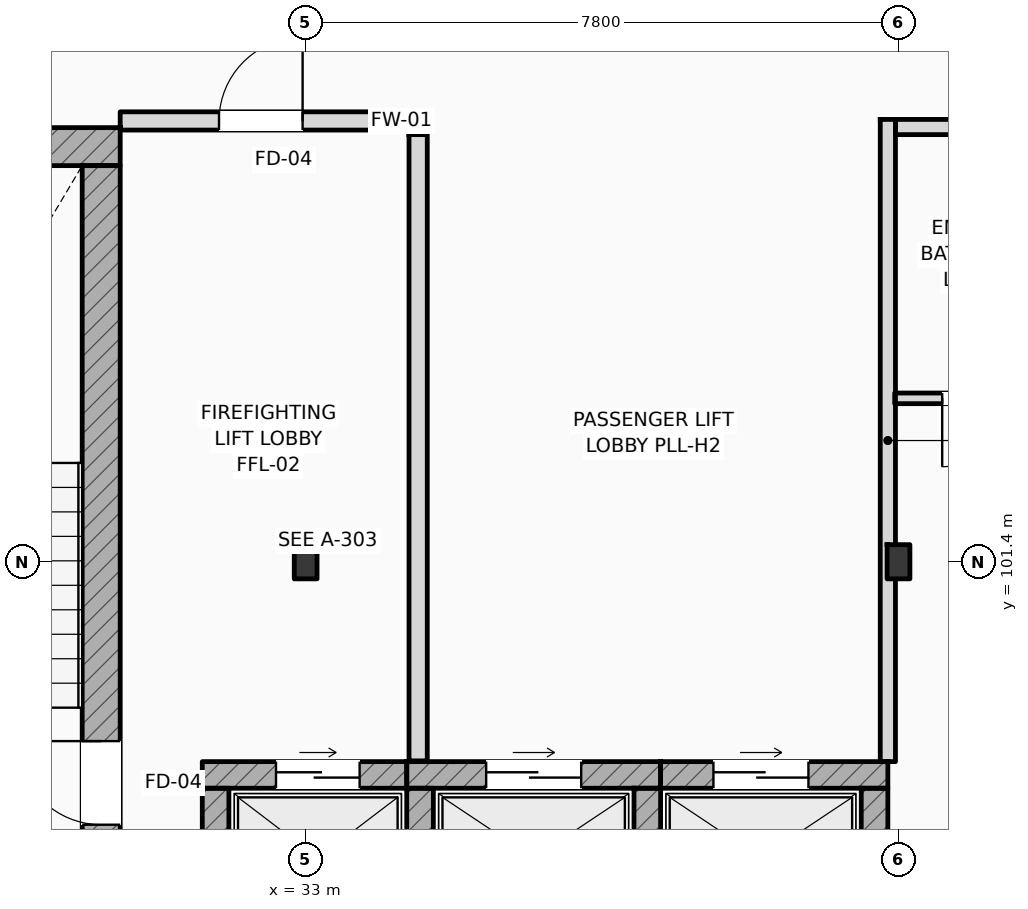
"""IFC4 building model, lengths in metres.
Left out: names, types, materials, properties, quantities, classifications, styles, units other than length and angle.
Written with IfcOpenShell. Run it as: python <this file> out.ifc"""

import sys

from ifc_helpers import new_model, si_unit, direction, frame, frame_2d, origin, origin_2d, place, context, subcontext, project, spatial, rectangle, i_section, extrude, element, fill, save


model = new_model("IFC4")
c1 = context("Model", 3, precision=1e-05, world=origin(), true_north=direction((0.0, 1.0)))
c2 = subcontext(c1, "Body", "Model", "MODEL_VIEW")
j1 = project(units=[si_unit("LENGTHUNIT", "METRE"), si_unit("PLANEANGLEUNIT", "RADIAN")], contexts=[c1])
p1 = place(None, origin())
s1 = spatial("IfcSite", under=j1, at=p1, CompositionType="ELEMENT")
p2 = place(p1, origin())
s2 = spatial("IfcBuilding", under=s1, at=p2, CompositionType="ELEMENT")
p3 = place(p2, frame((0.0, 0.0, 35.4)))
s3 = spatial("IfcBuildingStorey", under=s2, at=p3, CompositionType="ELEMENT", Elevation=35.4)
for number, where, z_axis, x_axis in (
    (1, (33.0, 101.4, 0.0), (0.0, 0.0, 1.0), (1.0, 0.0, 0.0)),
    (2, (40.8, 101.4, 0.0), (0.0, 0.0, 1.0), (1.0, 0.0, 0.0)),
):
    element("IfcColumn", number, at=place(p3, frame(where, z_axis=z_axis, x_axis=x_axis)), inside=s3, PredefinedType="COLUMN", context=c2, shape_type="SweptSolid", body=[
        extrude(i_section(OverallWidth=0.3, OverallDepth=0.45, WebThickness=0.014, FlangeThickness=0.026, FilletRadius=0.027, at=origin_2d()), origin(), (0.0, 0.0, 1.0), 3.6),
    ])
p4 = place(p3, frame((25.4, 106.862, 0.0), z_axis=(0.0, 0.0, 1.0), x_axis=(1.0, 0.0, 0.0)))
e3 = element("IfcWall", 3, at=p4, inside=s3, PredefinedType="SHEAR", context=c2, shape_type="SweptSolid", body=[
    extrude(rectangle(XDim=5.16, YDim=0.5, at=frame_2d((2.58, 0.0))), origin(), (0.0, 0.0, 1.0), 3.6),
])
p5 = place(p3, frame((30.31, 97.5, 0.0), z_axis=(0.0, 0.0, 1.0), x_axis=(0.0, 1.0, 0.0)))
e4 = element("IfcWall", 4, at=p5, inside=s3, PredefinedType="SHEAR", context=c2, shape_type="SweptSolid", body=[
    extrude(rectangle(XDim=9.112, YDim=0.5, at=frame_2d((4.556, 0.0))), origin(), (0.0, 0.0, 1.0), 3.6),
])
p6 = place(p5, frame((0.44, 0.0, 0.0)))
e5 = element("IfcOpeningElement", 5, at=p6, cuts=e4, PredefinedType="OPENING", context=c2, shape_type="SweptSolid", body=[
    extrude(rectangle(XDim=1.1, YDim=2.2, at=frame_2d((0.55, 1.1))), frame((0.0, 0.26, 0.0), z_axis=(0.0, -1.0, 0.0), x_axis=(1.0, 0.0, 0.0)), (0.0, 0.0, 1.0), 0.52),
])
p7 = place(p3, frame((31.64, 98.595, 0.0), z_axis=(0.0, 0.0, 1.0), x_axis=(1.0, 0.0, 0.0)))
e6 = element("IfcWall", 6, at=p7, inside=s3, PredefinedType="SHEAR", context=c2, shape_type="SweptSolid", body=[
    extrude(rectangle(XDim=2.69, YDim=0.35, at=frame_2d((1.345, 0.0))), origin(), (0.0, 0.0, 1.0), 3.38),
])
p8 = place(p7, frame((0.97, 0.0, 0.0)))
e7 = element("IfcOpeningElement", 7, at=p8, cuts=e6, PredefinedType="OPENING", context=c2, shape_type="SweptSolid", body=[
    extrude(rectangle(XDim=1.1, YDim=2.2, at=frame_2d((0.55, 1.1))), frame((0.0, 0.185, 0.0), z_axis=(0.0, -1.0, 0.0), x_axis=(1.0, 0.0, 0.0)), (0.0, 0.0, 1.0), 0.37),
])
p9 = place(p3, frame((31.815, 96.58, 0.0), z_axis=(0.0, 0.0, 1.0), x_axis=(0.0, 1.0, 0.0)))
e8 = element("IfcWall", 8, at=p9, inside=s3, PredefinedType="SHEAR", context=c2, shape_type="SweptSolid", body=[
    extrude(rectangle(XDim=1.84, YDim=0.35, at=frame_2d((0.92, 0.0))), origin(), (0.0, 0.0, 1.0), 3.38),
])
p10 = place(p3, frame((34.33, 98.595, 0.0), z_axis=(0.0, 0.0, 1.0), x_axis=(1.0, 0.0, 0.0)))
e9 = element("IfcWall", 9, at=p10, inside=s3, PredefinedType="SHEAR", context=c2, shape_type="SweptSolid", body=[
    extrude(rectangle(XDim=3.34, YDim=0.35, at=frame_2d((1.67, 0.0))), origin(), (0.0, 0.0, 1.0), 3.38),
])
p11 = place(p10, frame((1.045, 0.0, 0.0)))
e10 = element("IfcOpeningElement", 10, at=p11, cuts=e9, PredefinedType="OPENING", context=c2, shape_type="SweptSolid", body=[
    extrude(rectangle(XDim=1.25, YDim=2.25, at=frame_2d((0.625, 1.125))), frame((0.0, 0.185, 0.0), z_axis=(0.0, -1.0, 0.0), x_axis=(1.0, 0.0, 0.0)), (0.0, 0.0, 1.0), 0.37),
])
for number, where, z_axis, x_axis in (
    (11, (34.505, 96.58, 0.0), (0.0, 0.0, 1.0), (0.0, 1.0, 0.0)),
    (12, (37.495, 96.58, 0.0), (0.0, 0.0, 1.0), (0.0, 1.0, 0.0)),
):
    element("IfcWall", number, at=place(p3, frame(where, z_axis=z_axis, x_axis=x_axis)), inside=s3, PredefinedType="SHEAR", context=c2, shape_type="SweptSolid", body=[
        extrude(rectangle(XDim=1.84, YDim=0.35, at=frame_2d((0.92, 0.0))), origin(), (0.0, 0.0, 1.0), 3.38),
    ])
p12 = place(p3, frame((37.67, 98.595, 0.0), z_axis=(0.0, 0.0, 1.0), x_axis=(1.0, 0.0, 0.0)))
e13 = element("IfcWall", 13, at=p12, inside=s3, PredefinedType="SHEAR", context=c2, shape_type="SweptSolid", body=[
    extrude(rectangle(XDim=2.99, YDim=0.35, at=frame_2d((1.495, 0.0))), origin(), (0.0, 0.0, 1.0), 3.38),
])
p13 = place(p12, frame((0.695, 0.0, 0.0)))
e14 = element("IfcOpeningElement", 14, at=p13, cuts=e13, PredefinedType="OPENING", context=c2, shape_type="SweptSolid", body=[
    extrude(rectangle(XDim=1.25, YDim=2.25, at=frame_2d((0.625, 1.125))), frame((0.0, 0.185, 0.0), z_axis=(0.0, -1.0, 0.0), x_axis=(1.0, 0.0, 0.0)), (0.0, 0.0, 1.0), 0.37),
])
p14 = place(p3, frame((40.485, 96.58, 0.0), z_axis=(0.0, 0.0, 1.0), x_axis=(0.0, 1.0, 0.0)))
e15 = element("IfcWall", 15, at=p14, inside=s3, PredefinedType="SHEAR", context=c2, shape_type="SweptSolid", body=[
    extrude(rectangle(XDim=1.84, YDim=0.35, at=frame_2d((0.92, 0.0))), origin(), (0.0, 0.0, 1.0), 3.01),
])
p15 = place(p3, frame((34.48, 98.78, 0.0), z_axis=(0.0, 0.0, 1.0), x_axis=(0.0, 1.0, 0.0)))
e16 = element("IfcWall", 16, at=p15, inside=s3, PredefinedType="STANDARD", context=c2, shape_type="SweptSolid", body=[
    extrude(rectangle(XDim=8.24, YDim=0.24, at=frame_2d((4.12, 0.0))), origin(), (0.0, 0.0, 1.0), 3.38),
])
p16 = place(p3, frame((30.56, 107.2, 0.0), z_axis=(0.0, 0.0, 1.0), x_axis=(1.0, 0.0, 0.0)))
e17 = element("IfcWall", 17, at=p16, inside=s3, PredefinedType="STANDARD", context=c2, shape_type="SweptSolid", body=[
    extrude(rectangle(XDim=4.1, YDim=0.24, at=frame_2d((2.05, 0.0))), origin(), (0.0, 0.0, 1.0), 3.38),
])
p17 = place(p16, frame((1.3, 0.0, 0.0)))
e18 = element("IfcOpeningElement", 18, at=p17, cuts=e17, PredefinedType="OPENING", context=c2, shape_type="SweptSolid", body=[
    extrude(rectangle(XDim=1.1, YDim=2.2, at=frame_2d((0.55, 1.1))), frame((0.0, 0.13, 0.0), z_axis=(0.0, -1.0, 0.0), x_axis=(1.0, 0.0, 0.0)), (0.0, 0.0, 1.0), 0.26),
])
p18 = place(p3, frame((40.76, 107.12, 0.0), z_axis=(0.0, 0.0, 1.0), x_axis=(1.0, 0.0, 0.0)))
e19 = element("IfcWall", 19, at=p18, inside=s3, PredefinedType="PARTITIONING", context=c2, shape_type="SweptSolid", body=[
    extrude(rectangle(XDim=23.44, YDim=0.2, at=frame_2d((11.72, 0.0))), origin(), (0.0, 0.0, 1.0), 3.38),
])
p19 = place(p18, frame((2.629, 0.0, 0.0)))
e20 = element("IfcOpeningElement", 20, at=p19, cuts=e19, PredefinedType="OPENING", context=c2, shape_type="SweptSolid", body=[
    extrude(rectangle(XDim=0.96, YDim=2.2, at=frame_2d((0.48, 1.1))), frame((0.0, 0.11, 0.0), z_axis=(0.0, -1.0, 0.0), x_axis=(1.0, 0.0, 0.0)), (0.0, 0.0, 1.0), 0.22),
])
p20 = place(p18, frame((4.343, 0.0, 0.0)))
e21 = element("IfcOpeningElement", 21, at=p20, cuts=e19, PredefinedType="OPENING", context=c2, shape_type="SweptSolid", body=[
    extrude(rectangle(XDim=0.96, YDim=2.2, at=frame_2d((0.48, 1.1))), frame((0.0, 0.11, 0.0), z_axis=(0.0, -1.0, 0.0), x_axis=(1.0, 0.0, 0.0)), (0.0, 0.0, 1.0), 0.22),
])
p21 = place(p18, frame((10.401, 0.0, 0.0)))
e22 = element("IfcOpeningElement", 22, at=p21, cuts=e19, PredefinedType="OPENING", context=c2, shape_type="SweptSolid", body=[
    extrude(rectangle(XDim=0.96, YDim=2.2, at=frame_2d((0.48, 1.1))), frame((0.0, 0.11, 0.0), z_axis=(0.0, -1.0, 0.0), x_axis=(1.0, 0.0, 0.0)), (0.0, 0.0, 1.0), 0.22),
])
p22 = place(p18, frame((12.159, 0.0, 0.0)))
e23 = element("IfcOpeningElement", 23, at=p22, cuts=e19, PredefinedType="OPENING", context=c2, shape_type="SweptSolid", body=[
    extrude(rectangle(XDim=0.96, YDim=2.2, at=frame_2d((0.48, 1.1))), frame((0.0, 0.11, 0.0), z_axis=(0.0, -1.0, 0.0), x_axis=(1.0, 0.0, 0.0)), (0.0, 0.0, 1.0), 0.22),
])
p23 = place(p18, frame((18.218, 0.0, 0.0)))
e24 = element("IfcOpeningElement", 24, at=p23, cuts=e19, PredefinedType="OPENING", context=c2, shape_type="SweptSolid", body=[
    extrude(rectangle(XDim=0.96, YDim=2.2, at=frame_2d((0.48, 1.1))), frame((0.0, 0.11, 0.0), z_axis=(0.0, -1.0, 0.0), x_axis=(1.0, 0.0, 0.0)), (0.0, 0.0, 1.0), 0.22),
])
p24 = place(p18, frame((20.021, 0.0, 0.0)))
e25 = element("IfcOpeningElement", 25, at=p24, cuts=e19, PredefinedType="OPENING", context=c2, shape_type="SweptSolid", body=[
    extrude(rectangle(XDim=0.96, YDim=2.2, at=frame_2d((0.48, 1.1))), frame((0.0, 0.11, 0.0), z_axis=(0.0, -1.0, 0.0), x_axis=(1.0, 0.0, 0.0)), (0.0, 0.0, 1.0), 0.22),
])
p25 = place(p3, frame((40.66, 98.77, 0.0), z_axis=(0.0, 0.0, 1.0), x_axis=(0.0, 1.0, 0.0)))
e26 = element("IfcWall", 26, at=p25, inside=s3, PredefinedType="PARTITIONING", context=c2, shape_type="SweptSolid", body=[
    extrude(rectangle(XDim=8.45, YDim=0.2, at=frame_2d((4.225, 0.0))), origin(), (0.0, 0.0, 1.0), 3.01),
])
p26 = place(p3, frame((40.75, 103.55, 0.0), z_axis=(0.0, 0.0, 1.0), x_axis=(1.0, 0.0, 0.0)))
e27 = element("IfcWall", 27, at=p26, inside=s3, PredefinedType="PARTITIONING", context=c2, shape_type="SweptSolid", body=[
    extrude(rectangle(XDim=2.15, YDim=0.14, at=frame_2d((1.075, 0.0))), origin(), (0.0, 0.0, 1.0), 3.38),
])
p27 = place(p26, frame((0.625, 0.0, 0.0)))
e28 = element("IfcOpeningElement", 28, at=p27, cuts=e27, PredefinedType="OPENING", context=c2, shape_type="SweptSolid", body=[
    extrude(rectangle(XDim=0.9, YDim=2.1, at=frame_2d((0.45, 1.05))), frame((0.0, 0.08, 0.0), z_axis=(0.0, -1.0, 0.0), x_axis=(1.0, 0.0, 0.0)), (0.0, 0.0, 1.0), 0.16),
])
p28 = place(p6, origin())
e29 = element("IfcDoor", 29, at=p28, inside=s3, OperationType="SINGLE_SWING_RIGHT", PredefinedType="DOOR", context=c2, shape_type="SweptSolid", body=[
    extrude(rectangle(XDim=1.1, YDim=2.2, at=frame_2d((0.55, 1.1))), frame((0.0, 0.025, 0.0), z_axis=(0.0, -1.0, 0.0), x_axis=(1.0, 0.0, 0.0)), (0.0, 0.0, 1.0), 0.05),
])
fill(e5, e29)
p29 = place(p8, origin())
e30 = element("IfcDoor", 30, at=p29, inside=s3, OperationType="SLIDING_TO_LEFT", PredefinedType="DOOR", context=c2, shape_type="SweptSolid", body=[
    extrude(rectangle(XDim=1.1, YDim=2.2, at=frame_2d((0.55, 1.1))), frame((0.0, 0.025, 0.0), z_axis=(0.0, -1.0, 0.0), x_axis=(1.0, 0.0, 0.0)), (0.0, 0.0, 1.0), 0.05),
])
fill(e7, e30)
p30 = place(p11, origin())
e31 = element("IfcDoor", 31, at=p30, inside=s3, OperationType="SLIDING_TO_LEFT", PredefinedType="DOOR", context=c2, shape_type="SweptSolid", body=[
    extrude(rectangle(XDim=1.25, YDim=2.25, at=frame_2d((0.625, 1.125))), frame((0.0, 0.025, 0.0), z_axis=(0.0, -1.0, 0.0), x_axis=(1.0, 0.0, 0.0)), (0.0, 0.0, 1.0), 0.05),
])
fill(e10, e31)
p31 = place(p13, origin())
e32 = element("IfcDoor", 32, at=p31, inside=s3, OperationType="SLIDING_TO_LEFT", PredefinedType="DOOR", context=c2, shape_type="SweptSolid", body=[
    extrude(rectangle(XDim=1.25, YDim=2.25, at=frame_2d((0.625, 1.125))), frame((0.0, 0.025, 0.0), z_axis=(0.0, -1.0, 0.0), x_axis=(1.0, 0.0, 0.0)), (0.0, 0.0, 1.0), 0.05),
])
fill(e14, e32)
p32 = place(p17, origin())
e33 = element("IfcDoor", 33, at=p32, inside=s3, OperationType="SINGLE_SWING_RIGHT", PredefinedType="DOOR", context=c2, shape_type="SweptSolid", body=[
    extrude(rectangle(XDim=1.1, YDim=2.2, at=frame_2d((0.55, 1.1))), frame((0.0, 0.025, 0.0), z_axis=(0.0, -1.0, 0.0), x_axis=(1.0, 0.0, 0.0)), (0.0, 0.0, 1.0), 0.05),
])
fill(e18, e33)
p33 = place(p27, frame((0.9, 0.0, 0.0), z_axis=(0.0, 0.0, 1.0), x_axis=(-1.0, 0.0, 0.0)))
e34 = element("IfcDoor", 34, at=p33, inside=s3, OperationType="SINGLE_SWING_LEFT", PredefinedType="DOOR", context=c2, shape_type="SweptSolid", body=[
    extrude(rectangle(XDim=0.9, YDim=2.1, at=frame_2d((0.45, 1.05))), frame((0.0, 0.025, 0.0), z_axis=(0.0, -1.0, 0.0), x_axis=(1.0, 0.0, 0.0)), (0.0, 0.0, 1.0), 0.05),
])
fill(e28, e34)
save(model, sys.argv[1])
